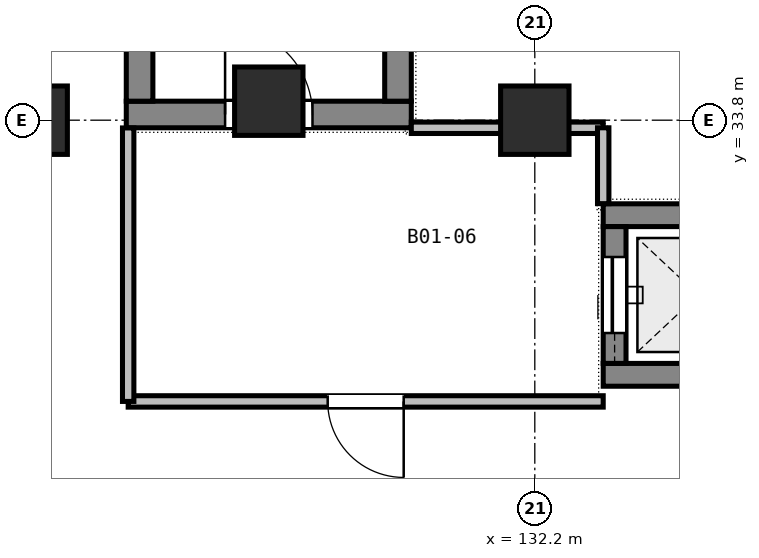
"""IFC4 building model, lengths in metres.
Left out: names, types, materials, properties, quantities, classifications, styles, units other than length and angle.
Written with IfcOpenShell. Run it as: python <this file> out.ifc"""

import sys

from ifc_helpers import new_model, si_unit, direction, frame, frame_2d, origin, origin_2d, place, context, subcontext, project, spatial, rectangle, extrude, element, fill, save


model = new_model("IFC4")
c1 = context("Model", 3, precision=1e-05, world=origin(), true_north=direction((0.0, 1.0)))
c2 = subcontext(c1, "Body", "Model", "MODEL_VIEW")
j1 = project(units=[si_unit("LENGTHUNIT", "METRE"), si_unit("PLANEANGLEUNIT", "RADIAN")], contexts=[c1])
p1 = place(None, origin())
s1 = spatial("IfcSite", under=j1, at=p1, CompositionType="ELEMENT")
p2 = place(p1, origin())
s2 = spatial("IfcBuilding", under=s1, at=p2, CompositionType="ELEMENT")
p3 = place(p2, frame((0.0, 0.0, -4.5)))
s3 = spatial("IfcBuildingStorey", under=s2, at=p3, CompositionType="ELEMENT", Elevation=-4.5)
for number, where, z_axis, x_axis in (
    (1, (125.6, 33.8, 0.0), (0.0, 0.0, 1.0), (1.0, 0.0, 0.0)),
    (2, (132.2, 33.8, 0.0), (0.0, 0.0, 1.0), (1.0, 0.0, 0.0)),
):
    element("IfcColumn", number, at=place(p3, frame(where, z_axis=z_axis, x_axis=x_axis)), inside=s3, PredefinedType="COLUMN", context=c2, shape_type="SweptSolid", body=[
        extrude(rectangle(XDim=0.7, YDim=0.7, at=origin_2d()), origin(), (0.0, 0.0, 1.0), 4.5),
    ])
p4 = place(p3, frame((126.825, 33.875, 0.0), z_axis=(0.0, 0.0, 1.0), x_axis=(1.0, 0.0, 0.0)))
e3 = element("IfcWall", 3, at=p4, inside=s3, PredefinedType="SHEAR", context=c2, shape_type="SweptSolid", body=[
    extrude(rectangle(XDim=3.75, YDim=0.35, at=frame_2d((1.875, 0.0))), origin(), (0.0, 0.0, 1.0), 4.5),
])
p5 = place(p4, frame((1.3, 0.0, 0.0)))
e4 = element("IfcOpeningElement", 4, at=p5, cuts=e3, PredefinedType="OPENING", context=c2, shape_type="SweptSolid", body=[
    extrude(rectangle(XDim=1.15, YDim=2.15, at=frame_2d((0.575, 1.075))), frame((0.0, 0.185, 0.0), z_axis=(0.0, -1.0, 0.0), x_axis=(1.0, 0.0, 0.0)), (0.0, 0.0, 1.0), 0.37),
])
for number, where, z_axis, x_axis in (
    (5, (127.0, 34.05, 0.0), (0.0, 0.0, 1.0), (0.0, 1.0, 0.0)),
    (6, (130.4, 34.05, 0.0), (0.0, 0.0, 1.0), (0.0, 1.0, 0.0)),
):
    element("IfcWall", number, at=place(p3, frame(where, z_axis=z_axis, x_axis=x_axis)), inside=s3, PredefinedType="SHEAR", context=c2, shape_type="SweptSolid", body=[
        extrude(rectangle(XDim=7.275, YDim=0.35, at=frame_2d((3.637, 0.0))), origin(), (0.0, 0.0, 1.0), 4.5),
    ])
for number, where, z_axis, x_axis in (
    (7, (133.1, 30.45, -0.82), (0.0, 0.0, 1.0), (1.0, 0.0, 0.0)),
    (8, (133.1, 32.55, -0.82), (0.0, 0.0, 1.0), (1.0, 0.0, 0.0)),
):
    element("IfcWall", number, at=place(p3, frame(where, z_axis=z_axis, x_axis=x_axis)), inside=s3, PredefinedType="SHEAR", context=c2, shape_type="SweptSolid", body=[
        extrude(rectangle(XDim=2.5, YDim=0.3, at=frame_2d((1.25, 0.0))), origin(), (0.0, 0.0, 1.0), 5.32),
    ])
p6 = place(p3, frame((133.25, 30.6, -0.82), z_axis=(0.0, 0.0, 1.0), x_axis=(0.0, 1.0, 0.0)))
e9 = element("IfcWall", 9, at=p6, inside=s3, PredefinedType="SHEAR", context=c2, shape_type="SweptSolid", body=[
    extrude(rectangle(XDim=1.8, YDim=0.3, at=frame_2d((0.9, 0.0))), origin(), (0.0, 0.0, 1.0), 5.32),
])
p7 = place(p6, frame((0.4, 0.0, 0.82)))
e10 = element("IfcOpeningElement", 10, at=p7, cuts=e9, PredefinedType="OPENING", context=c2, shape_type="SweptSolid", body=[
    extrude(rectangle(XDim=1.0, YDim=2.1, at=frame_2d((0.5, 1.05))), frame((0.0, 0.16, 0.0), z_axis=(0.0, -1.0, 0.0), x_axis=(1.0, 0.0, 0.0)), (0.0, 0.0, 1.0), 0.32),
])
for number, where, z_axis, x_axis in (
    (11, (125.6, 33.8, -1.2), (0.0, 0.0, 1.0), (1.0, 0.0, 0.0)),
    (12, (128.7, 34.05, -1.2), (0.0, 0.0, 1.0), (1.0, 0.0, 0.0)),
    (13, (132.2, 33.8, -1.2), (0.0, 0.0, 1.0), (1.0, 0.0, 0.0)),
):
    element("IfcColumn", number, at=place(p3, frame(where, z_axis=z_axis, x_axis=x_axis)), inside=s3, PredefinedType="COLUMN", context=c2, shape_type="SweptSolid", body=[
        extrude(rectangle(XDim=0.9, YDim=0.9, at=origin_2d()), origin(), (0.0, 0.0, 1.0), 1.2),
    ])
p8 = place(p3, frame((130.575, 33.7, 0.0), z_axis=(0.0, 0.0, 1.0), x_axis=(1.0, 0.0, 0.0)))
e14 = element("IfcWall", 14, at=p8, inside=s3, PredefinedType="PARTITIONING", context=c2, shape_type="SweptSolid", body=[
    extrude(rectangle(XDim=1.275, YDim=0.15, at=frame_2d((0.638, 0.0))), origin(), (0.0, 0.0, 1.0), 3.835),
])
p9 = place(p3, frame((132.55, 33.7, 0.0), z_axis=(0.0, 0.0, 1.0), x_axis=(1.0, 0.0, 0.0)))
e15 = element("IfcWall", 15, at=p9, inside=s3, PredefinedType="PARTITIONING", context=c2, shape_type="SweptSolid", body=[
    extrude(rectangle(XDim=0.55, YDim=0.15, at=frame_2d((0.275, 0.0))), origin(), (0.0, 0.0, 1.0), 3.835),
])
p10 = place(p3, frame((133.1, 33.7, 0.0), z_axis=(0.0, 0.0, 1.0), x_axis=(0.0, -1.0, 0.0)))
e16 = element("IfcWall", 16, at=p10, inside=s3, PredefinedType="PARTITIONING", context=c2, shape_type="SweptSolid", body=[
    extrude(rectangle(XDim=0.998, YDim=0.15, at=frame_2d((0.499, 0.0))), origin(), (0.0, 0.0, 1.0), 3.835),
])
p11 = place(p3, frame((133.1, 30.1, 0.0), z_axis=(0.0, 0.0, 1.0), x_axis=(-1.0, 0.0, 0.0)))
e17 = element("IfcWall", 17, at=p11, inside=s3, PredefinedType="PARTITIONING", context=c2, shape_type="SweptSolid", body=[
    extrude(rectangle(XDim=6.25, YDim=0.15, at=frame_2d((3.125, 0.0))), origin(), (0.0, 0.0, 1.0), 3.635),
])
p12 = place(p11, frame((2.625, 0.0, 0.0)))
e18 = element("IfcOpeningElement", 18, at=p12, cuts=e17, PredefinedType="OPENING", context=c2, shape_type="SweptSolid", body=[
    extrude(rectangle(XDim=1.0, YDim=2.1, at=frame_2d((0.5, 1.05))), frame((0.0, 0.085, 0.0), z_axis=(0.0, -1.0, 0.0), x_axis=(1.0, 0.0, 0.0)), (0.0, 0.0, 1.0), 0.17),
])
p13 = place(p3, frame((126.85, 30.1, 0.0), z_axis=(0.0, 0.0, 1.0), x_axis=(0.0, 1.0, 0.0)))
e19 = element("IfcWall", 19, at=p13, inside=s3, PredefinedType="PARTITIONING", context=c2, shape_type="SweptSolid", body=[
    extrude(rectangle(XDim=3.598, YDim=0.15, at=frame_2d((1.799, 0.0))), origin(), (0.0, 0.0, 1.0), 3.835),
])
p14 = place(p5, origin())
e20 = element("IfcDoor", 20, at=p14, inside=s3, OperationType="SINGLE_SWING_LEFT", PredefinedType="DOOR", context=c2, shape_type="SweptSolid", body=[
    extrude(rectangle(XDim=1.15, YDim=2.15, at=frame_2d((0.575, 1.075))), frame((0.0, 0.025, 0.0), z_axis=(0.0, -1.0, 0.0), x_axis=(1.0, 0.0, 0.0)), (0.0, 0.0, 1.0), 0.05),
])
fill(e4, e20)
p15 = place(p7, origin())
e21 = element("IfcDoor", 21, at=p15, inside=s3, OperationType="SLIDING_TO_LEFT", PredefinedType="DOOR", context=c2, shape_type="SweptSolid", body=[
    extrude(rectangle(XDim=1.0, YDim=2.1, at=frame_2d((0.5, 1.05))), frame((0.0, 0.025, 0.0), z_axis=(0.0, -1.0, 0.0), x_axis=(1.0, 0.0, 0.0)), (0.0, 0.0, 1.0), 0.05),
])
fill(e10, e21)
p16 = place(p12, origin())
e22 = element("IfcDoor", 22, at=p16, inside=s3, OperationType="SINGLE_SWING_LEFT", PredefinedType="DOOR", context=c2, shape_type="SweptSolid", body=[
    extrude(rectangle(XDim=1.0, YDim=2.1, at=frame_2d((0.5, 1.05))), frame((0.0, 0.025, 0.0), z_axis=(0.0, -1.0, 0.0), x_axis=(1.0, 0.0, 0.0)), (0.0, 0.0, 1.0), 0.05),
])
fill(e18, e22)
save(model, sys.argv[1])
